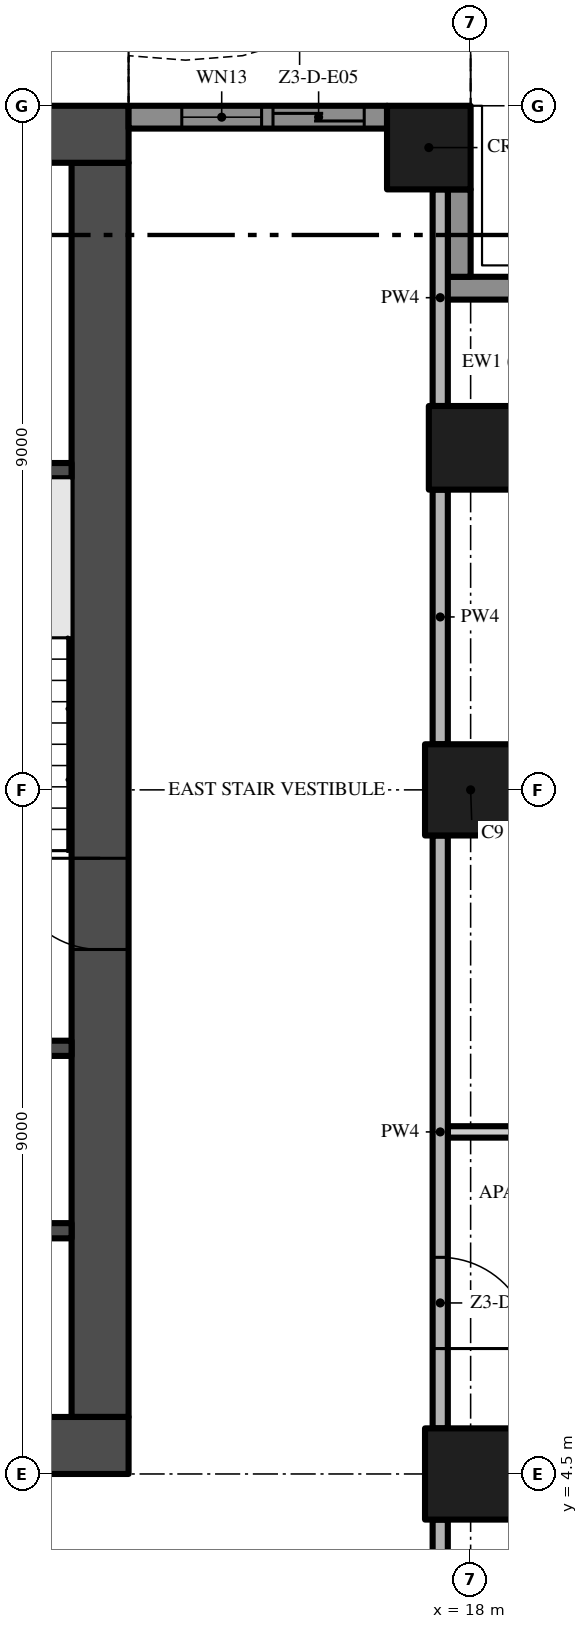
"""IFC4 building model, lengths in metres.
Left out: names, types, materials, properties, quantities, classifications, styles, units other than length and angle.
Written with IfcOpenShell. Run it as: python <this file> out.ifc"""

import sys

from ifc_helpers import new_model, si_unit, direction, frame, frame_2d, origin, origin_2d, place, context, subcontext, project, spatial, polyline, rectangle, outline, extrude, element, fill, save


model = new_model("IFC4")
c1 = context("Model", 3, precision=1e-05, world=origin(), true_north=direction((0.0, 1.0)))
c2 = subcontext(c1, "Body", "Model", "MODEL_VIEW")
j1 = project(units=[si_unit("LENGTHUNIT", "METRE"), si_unit("PLANEANGLEUNIT", "RADIAN")], contexts=[c1])
p1 = place(None, origin())
s1 = spatial("IfcSite", under=j1, at=p1, CompositionType="ELEMENT")
p2 = place(p1, origin())
s2 = spatial("IfcBuilding", under=s1, at=p2, CompositionType="ELEMENT")
p3 = place(p2, frame((0.0, 0.0, 159.2)))
s3 = spatial("IfcBuildingStorey", under=s2, at=p3, CompositionType="ELEMENT", Elevation=159.2)
p4 = place(p3, frame((-13.5, 4.875, -0.3), z_axis=(0.0, 0.0, 1.0), x_axis=(1.0, 0.0, 0.0)))
e1 = element("IfcWall", 1, at=p4, inside=s3, PredefinedType="SHEAR", context=c2, shape_type="SweptSolid", body=[
    extrude(rectangle(XDim=27.0, YDim=0.75, at=frame_2d((13.5, 0.0))), origin(), (0.0, 0.0, 1.0), 3.8),
])
p5 = place(p4, frame((12.0, 0.0, 0.3)))
e2 = element("IfcOpeningElement", 2, at=p5, cuts=e1, PredefinedType="OPENING", context=c2, shape_type="SweptSolid", body=[
    extrude(rectangle(XDim=3.0, YDim=2.4, at=frame_2d((1.5, 1.2))), frame((0.0, 0.385, 0.0), z_axis=(0.0, -1.0, 0.0), x_axis=(1.0, 0.0, 0.0)), (0.0, 0.0, 1.0), 0.77),
])
p6 = place(p4, frame((4.9, 0.0, 0.3)))
e3 = element("IfcOpeningElement", 3, at=p6, cuts=e1, PredefinedType="OPENING", context=c2, shape_type="SweptSolid", body=[
    extrude(rectangle(XDim=1.2, YDim=2.2, at=frame_2d((0.6, 1.1))), frame((0.0, 0.385, 0.0), z_axis=(0.0, -1.0, 0.0), x_axis=(1.0, 0.0, 0.0)), (0.0, 0.0, 1.0), 0.77),
])
p7 = place(p4, frame((20.75, 0.0, 0.3)))
e4 = element("IfcOpeningElement", 4, at=p7, cuts=e1, PredefinedType="OPENING", context=c2, shape_type="SweptSolid", body=[
    extrude(rectangle(XDim=1.5, YDim=2.2, at=frame_2d((0.75, 1.1))), frame((0.0, 0.385, 0.0), z_axis=(0.0, -1.0, 0.0), x_axis=(1.0, 0.0, 0.0)), (0.0, 0.0, 1.0), 0.77),
])
p8 = place(p4, frame((17.4, 0.0, 0.3)))
e5 = element("IfcOpeningElement", 5, at=p8, cuts=e1, PredefinedType="OPENING", context=c2, shape_type="SweptSolid", body=[
    extrude(rectangle(XDim=1.2, YDim=2.2, at=frame_2d((0.6, 1.1))), frame((0.0, 0.385, 0.0), z_axis=(0.0, -1.0, 0.0), x_axis=(1.0, 0.0, 0.0)), (0.0, 0.0, 1.0), 0.77),
])
p9 = place(p3, frame((13.125, 5.25, -0.3), z_axis=(0.0, 0.0, 1.0), x_axis=(0.0, 1.0, 0.0)))
e6 = element("IfcWall", 6, at=p9, inside=s3, PredefinedType="SHEAR", context=c2, shape_type="SweptSolid", body=[
    extrude(rectangle(XDim=16.5, YDim=0.75, at=frame_2d((8.25, 0.0))), origin(), (0.0, 0.0, 1.0), 3.8),
])
p10 = place(p9, frame((6.15, 0.0, 0.3)))
e7 = element("IfcOpeningElement", 7, at=p10, cuts=e6, PredefinedType="OPENING", context=c2, shape_type="SweptSolid", body=[
    extrude(rectangle(XDim=1.2, YDim=2.2, at=frame_2d((0.6, 1.1))), frame((0.0, 0.385, 0.0), z_axis=(0.0, -1.0, 0.0), x_axis=(1.0, 0.0, 0.0)), (0.0, 0.0, 1.0), 0.77),
])
p11 = place(p3, frame((13.5, 22.125, -0.3), z_axis=(0.0, 0.0, 1.0), x_axis=(-1.0, 0.0, 0.0)))
e8 = element("IfcWall", 8, at=p11, inside=s3, PredefinedType="SHEAR", context=c2, shape_type="SweptSolid", body=[
    extrude(rectangle(XDim=27.0, YDim=0.75, at=frame_2d((13.5, 0.0))), origin(), (0.0, 0.0, 1.0), 3.8),
])
p12 = place(p3, frame((18.0, 13.5, 0.0), z_axis=(0.0, 0.0, 1.0), x_axis=(1.0, 0.0, 0.0)))
e9 = element("IfcColumn", 9, at=p12, inside=s3, PredefinedType="COLUMN", context=c2, shape_type="SweptSolid", body=[
    extrude(rectangle(XDim=1.2, YDim=1.2, at=origin_2d()), origin(), (0.0, 0.0, 1.0), 3.5),
])
p13 = place(p3, frame((17.45, 21.95, 0.0), z_axis=(0.0, 0.0, 1.0), x_axis=(1.0, 0.0, 0.0)))
e10 = element("IfcColumn", 10, at=p13, inside=s3, PredefinedType="COLUMN", context=c2, shape_type="SweptSolid", body=[
    extrude(rectangle(XDim=1.1, YDim=1.1, at=origin_2d()), origin(), (0.0, 0.0, 1.0), 3.5),
])
p14 = place(p3, frame((18.0, 4.5, 0.0), z_axis=(0.0, 0.0, 1.0), x_axis=(1.0, 0.0, 0.0)))
e11 = element("IfcColumn", 11, at=p14, inside=s3, PredefinedType="COLUMN", context=c2, shape_type="SweptSolid", body=[
    extrude(rectangle(XDim=1.2, YDim=1.2, at=origin_2d()), origin(), (0.0, 0.0, 1.0), 3.5),
])
p15 = place(p3, frame((18.0, 18.0, 0.0), z_axis=(0.0, 0.0, 1.0), x_axis=(1.0, 0.0, 0.0)))
e12 = element("IfcColumn", 12, at=p15, inside=s3, PredefinedType="COLUMN", context=c2, shape_type="SweptSolid", body=[
    extrude(rectangle(XDim=1.1, YDim=1.1, at=origin_2d()), origin(), (0.0, 0.0, 1.0), 3.5),
])
p16 = place(p3, frame((17.6, 20.1, 0.0), z_axis=(0.0, 0.0, 1.0), x_axis=(1.0, 0.0, 0.0)))
e13 = element("IfcWall", 13, at=p16, inside=s3, PredefinedType="SOLIDWALL", context=c2, shape_type="SweptSolid", body=[
    extrude(rectangle(XDim=2.35, YDim=0.3, at=frame_2d((1.175, 0.0))), origin(), (0.0, 0.0, 1.0), 3.5),
])
p17 = place(p3, frame((17.85, 21.4, 0.0), z_axis=(0.0, 0.0, 1.0), x_axis=(0.0, -1.0, 0.0)))
e14 = element("IfcWall", 14, at=p17, inside=s3, PredefinedType="SOLIDWALL", context=c2, shape_type="SweptSolid", body=[
    extrude(rectangle(XDim=1.15, YDim=0.3, at=frame_2d((0.575, 0.0))), origin(), (0.0, 0.0, 1.0), 3.5),
])
p18 = place(p3, frame((13.5, 22.35, 0.0), z_axis=(0.0, 0.0, 1.0), x_axis=(1.0, 0.0, 0.0)))
e15 = element("IfcWall", 15, at=p18, inside=s3, PredefinedType="SOLIDWALL", context=c2, shape_type="SweptSolid", body=[
    extrude(rectangle(XDim=3.4, YDim=0.3, at=frame_2d((1.7, 0.0))), origin(), (0.0, 0.0, 1.0), 3.5),
])
p19 = place(p18, frame((1.9, 0.0, 0.0)))
e16 = element("IfcOpeningElement", 16, at=p19, cuts=e15, PredefinedType="OPENING", context=c2, shape_type="SweptSolid", body=[
    extrude(rectangle(XDim=1.2, YDim=2.4, at=frame_2d((0.6, 1.2))), frame((0.0, 0.16, 0.0), z_axis=(0.0, -1.0, 0.0), x_axis=(1.0, 0.0, 0.0)), (0.0, 0.0, 1.0), 0.32),
])
p20 = place(p18, frame((0.7, 0.0, 0.45)))
e17 = element("IfcOpeningElement", 17, at=p20, cuts=e15, PredefinedType="OPENING", context=c2, shape_type="SweptSolid", body=[
    extrude(rectangle(XDim=1.05, YDim=2.65, at=frame_2d((0.525, 1.325))), frame((0.0, 0.16, 0.0), z_axis=(0.0, -1.0, 0.0), x_axis=(1.0, 0.0, 0.0)), (0.0, 0.0, 1.0), 0.32),
])
p21 = place(p3, origin())
e18 = element("IfcWall", 18, at=p21, inside=s3, PredefinedType="USERDEFINED", context=c2, shape_type="SweptSolid", body=[
    extrude(outline(polyline([(18.0, 24.3), (16.5, 23.595), (15.0, 23.159), (14.25, 23.1), (13.5, 23.159), (13.48, 22.909), (14.25, 22.849), (15.045, 22.911), (16.589, 23.36), (18.106, 24.074), (18.0, 24.3)])), origin(), (0.0, 0.0, 1.0), 0.9),
])
for number, where, z_axis, x_axis in (
    (19, (9.65, 7.7, 0.0), (0.0, 0.0, 1.0), (1.0, 0.0, 0.0)),
    (20, (9.65, 10.1, 0.0), (0.0, 0.0, 1.0), (1.0, 0.0, 0.0)),
    (21, (9.65, 17.7, 0.0), (0.0, 0.0, 1.0), (1.0, 0.0, 0.0)),
):
    element("IfcWall", number, at=place(p3, frame(where, z_axis=z_axis, x_axis=x_axis)), inside=s3, PredefinedType="SHEAR", context=c2, shape_type="SweptSolid", body=[
        extrude(rectangle(XDim=3.1, YDim=0.2, at=frame_2d((1.55, 0.0))), origin(), (0.0, 0.0, 1.0), 3.5),
    ])
p22 = place(p3, frame((17.7, 9.0, 0.0), z_axis=(0.0, 0.0, 1.0), x_axis=(1.0, 0.0, 0.0)))
e22 = element("IfcWall", 22, at=p22, inside=s3, PredefinedType="PARTITIONING", context=c2, shape_type="SweptSolid", body=[
    extrude(rectangle(XDim=4.5, YDim=0.15, at=frame_2d((2.25, 0.0))), origin(), (0.0, 0.0, 1.0), 3.5),
])
p23 = place(p22, frame((1.85, 0.0, 0.0)))
e23 = element("IfcOpeningElement", 23, at=p23, cuts=e22, PredefinedType="OPENING", context=c2, shape_type="SweptSolid", body=[
    extrude(rectangle(XDim=1.0, YDim=2.4, at=frame_2d((0.5, 1.2))), frame((0.0, 0.085, 0.0), z_axis=(0.0, -1.0, 0.0), x_axis=(1.0, 0.0, 0.0)), (0.0, 0.0, 1.0), 0.17),
])
p24 = place(p3, frame((17.6, -0.2, 0.0), z_axis=(0.0, 0.0, 1.0), x_axis=(0.0, 1.0, 0.0)))
e24 = element("IfcWall", 24, at=p24, inside=s3, PredefinedType="PARTITIONING", context=c2, shape_type="SweptSolid", body=[
    extrude(rectangle(XDim=4.1, YDim=0.2, at=frame_2d((2.05, 0.0))), origin(), (0.0, 0.0, 1.0), 3.5),
])
p25 = place(p3, frame((17.6, 12.9, 0.0), z_axis=(0.0, 0.0, 1.0), x_axis=(0.0, -1.0, 0.0)))
e25 = element("IfcWall", 25, at=p25, inside=s3, PredefinedType="PARTITIONING", context=c2, shape_type="SweptSolid", body=[
    extrude(rectangle(XDim=7.8, YDim=0.2, at=frame_2d((3.9, 0.0))), origin(), (0.0, 0.0, 1.0), 3.5),
])
p26 = place(p25, frame((5.55, 0.0, 0.0)))
e26 = element("IfcOpeningElement", 26, at=p26, cuts=e25, PredefinedType="OPENING", context=c2, shape_type="SweptSolid", body=[
    extrude(rectangle(XDim=1.2, YDim=2.4, at=frame_2d((0.6, 1.2))), frame((0.0, 0.11, 0.0), z_axis=(0.0, -1.0, 0.0), x_axis=(1.0, 0.0, 0.0)), (0.0, 0.0, 1.0), 0.22),
])
p27 = place(p3, frame((17.6, 14.1, 0.0), z_axis=(0.0, 0.0, 1.0), x_axis=(0.0, 1.0, 0.0)))
e27 = element("IfcWall", 27, at=p27, inside=s3, PredefinedType="PARTITIONING", context=c2, shape_type="SweptSolid", body=[
    extrude(rectangle(XDim=3.35, YDim=0.2, at=frame_2d((1.675, 0.0))), origin(), (0.0, 0.0, 1.0), 3.5),
])
p28 = place(p3, frame((17.6, 18.55, 0.0), z_axis=(0.0, 0.0, 1.0), x_axis=(0.0, 1.0, 0.0)))
e28 = element("IfcWall", 28, at=p28, inside=s3, PredefinedType="PARTITIONING", context=c2, shape_type="SweptSolid", body=[
    extrude(rectangle(XDim=2.85, YDim=0.2, at=frame_2d((1.425, 0.0))), origin(), (0.0, 0.0, 1.0), 3.5),
])
p29 = place(p19, origin())
e29 = element("IfcDoor", 29, at=p29, inside=s3, OperationType="SINGLE_SWING_LEFT", PredefinedType="DOOR", context=c2, shape_type="SweptSolid", body=[
    extrude(rectangle(XDim=1.2, YDim=2.4, at=frame_2d((0.6, 1.2))), frame((0.0, 0.025, 0.0), z_axis=(0.0, -1.0, 0.0), x_axis=(1.0, 0.0, 0.0)), (0.0, 0.0, 1.0), 0.05),
])
fill(e16, e29)
p30 = place(p20, origin())
e30 = element("IfcWindow", 30, at=p30, inside=s3, PartitioningType="SINGLE_PANEL", PredefinedType="WINDOW", context=c2, shape_type="SweptSolid", body=[
    extrude(rectangle(XDim=1.05, YDim=2.65, at=frame_2d((0.525, 1.325))), frame((0.0, 0.03, 0.0), z_axis=(0.0, -1.0, 0.0), x_axis=(1.0, 0.0, 0.0)), (0.0, 0.0, 1.0), 0.06),
])
fill(e17, e30)
p31 = place(p10, frame((1.2, 0.0, 0.0), z_axis=(0.0, 0.0, 1.0), x_axis=(-1.0, 0.0, 0.0)))
e31 = element("IfcDoor", 31, at=p31, inside=s3, OperationType="SINGLE_SWING_LEFT", PredefinedType="DOOR", context=c2, shape_type="SweptSolid", body=[
    extrude(rectangle(XDim=1.2, YDim=2.2, at=frame_2d((0.6, 1.1))), frame((0.0, 0.025, 0.0), z_axis=(0.0, -1.0, 0.0), x_axis=(1.0, 0.0, 0.0)), (0.0, 0.0, 1.0), 0.05),
])
fill(e7, e31)
p32 = place(p26, origin())
e32 = element("IfcDoor", 32, at=p32, inside=s3, OperationType="SINGLE_SWING_RIGHT", PredefinedType="DOOR", context=c2, shape_type="SweptSolid", body=[
    extrude(rectangle(XDim=1.2, YDim=2.4, at=frame_2d((0.6, 1.2))), frame((0.0, 0.025, 0.0), z_axis=(0.0, -1.0, 0.0), x_axis=(1.0, 0.0, 0.0)), (0.0, 0.0, 1.0), 0.05),
])
fill(e26, e32)
save(model, sys.argv[1])
